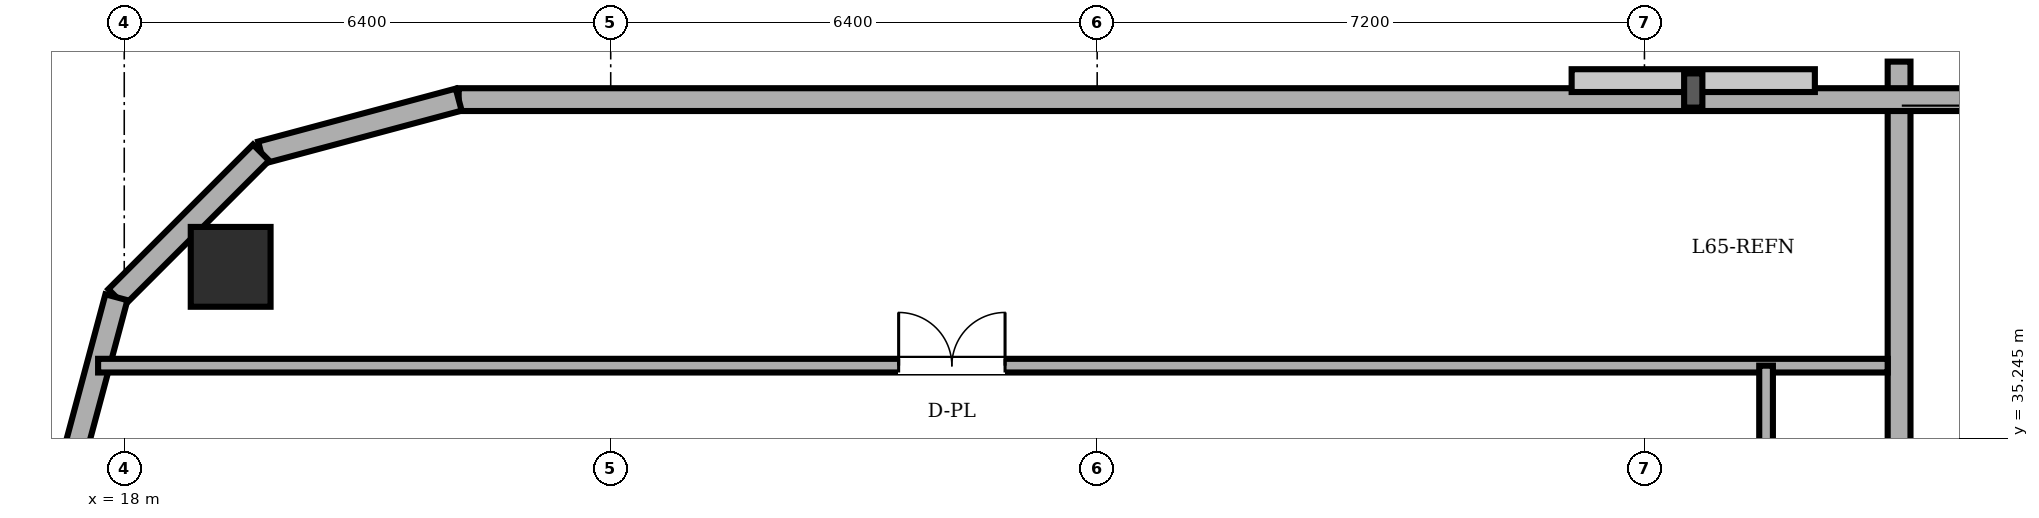
"""IFC4 building model, lengths in metres.
Left out: names, types, materials, properties, quantities, classifications, styles, units other than length and angle.
Written with IfcOpenShell. Run it as: python <this file> out.ifc"""

import sys

from ifc_helpers import new_model, si_unit, direction, frame, frame_2d, origin, origin_2d, place, context, subcontext, project, spatial, rectangle, circle, extrude, element, fill, save


model = new_model("IFC4")
c1 = context("Model", 3, precision=1e-05, world=origin(), true_north=direction((0.0, 1.0)))
c2 = subcontext(c1, "Body", "Model", "MODEL_VIEW")
j1 = project(units=[si_unit("LENGTHUNIT", "METRE"), si_unit("PLANEANGLEUNIT", "RADIAN")], contexts=[c1])
p1 = place(None, origin())
s1 = spatial("IfcSite", under=j1, at=p1, CompositionType="ELEMENT")
p2 = place(p1, origin())
s2 = spatial("IfcBuilding", under=s1, at=p2, CompositionType="ELEMENT")
p3 = place(p2, frame((0.0, 0.0, 248.1)))
s3 = spatial("IfcBuildingStorey", under=s2, at=p3, CompositionType="ELEMENT", Elevation=248.1)
p4 = place(p3, frame((19.4, 37.5, 0.0), z_axis=(0.0, 0.0, 1.0), x_axis=(1.0, 0.0, 0.0)))
e1 = element("IfcColumn", 1, at=p4, inside=s3, PredefinedType="COLUMN", context=c2, shape_type="SweptSolid", body=[
    extrude(circle(Radius=0.525, at=origin_2d()), origin(), (0.0, 0.0, 1.0), 2.96),
])
p5 = place(p3, frame((41.35, 7.8, 0.0), z_axis=(0.0, 0.0, 1.0), x_axis=(0.0, 1.0, 0.0)))
e2 = element("IfcWall", 2, at=p5, inside=s3, PredefinedType="SOLIDWALL", context=c2, shape_type="SweptSolid", body=[
    extrude(rectangle(XDim=32.4, YDim=0.3, at=frame_2d((16.2, 0.0))), origin(), (0.0, 0.0, 1.0), 5.36),
])
p6 = place(p3, frame((54.885, 39.7, 0.0), z_axis=(0.0, 0.0, 1.0), x_axis=(-1.0, 0.0, 0.0)))
e3 = element("IfcWall", 3, at=p6, inside=s3, PredefinedType="SOLIDWALL", context=c2, shape_type="SweptSolid", body=[
    extrude(rectangle(XDim=32.485, YDim=0.3, at=frame_2d((16.243, 0.0))), origin(), (0.0, 0.0, 1.0), 5.36),
])
p7 = place(p3, frame((22.4, 39.7, 0.0), z_axis=(0.0, 0.0, 1.0), x_axis=(-0.965889330541, -0.258955210695, 0.0)))
e4 = element("IfcWall", 4, at=p7, inside=s3, PredefinedType="SOLIDWALL", context=c2, shape_type="SweptSolid", body=[
    extrude(rectangle(XDim=2.692, YDim=0.3, at=frame_2d((1.346, 0.0))), origin(), (0.0, 0.0, 1.0), 5.36),
])
p8 = place(p3, frame((19.8, 39.003, 0.0), z_axis=(0.0, 0.0, 1.0), x_axis=(-0.707152139074, -0.70706142039, 0.0)))
e5 = element("IfcWall", 5, at=p8, inside=s3, PredefinedType="SOLIDWALL", context=c2, shape_type="SweptSolid", body=[
    extrude(rectangle(XDim=2.691, YDim=0.3, at=frame_2d((1.346, 0.0))), origin(), (0.0, 0.0, 1.0), 5.36),
])
p9 = place(p3, frame((17.897, 37.1, 0.0), z_axis=(0.0, 0.0, 1.0), x_axis=(-0.258932525951, -0.965895412042, 0.0)))
e6 = element("IfcWall", 6, at=p9, inside=s3, PredefinedType="SOLIDWALL", context=c2, shape_type="SweptSolid", body=[
    extrude(rectangle(XDim=2.692, YDim=0.3, at=frame_2d((1.346, 0.0))), origin(), (0.0, 0.0, 1.0), 5.36),
])
p10 = place(p3, frame((17.656, 36.2, 0.0), z_axis=(0.0, 0.0, 1.0), x_axis=(1.0, 0.0, 0.0)))
e7 = element("IfcWall", 7, at=p10, inside=s3, PredefinedType="PARTITIONING", context=c2, shape_type="SweptSolid", body=[
    extrude(rectangle(XDim=23.544, YDim=0.18, at=frame_2d((11.772, 0.0))), origin(), (0.0, 0.0, 1.0), 5.36),
])
p11 = place(p10, frame((10.532, 0.0, 0.0)))
e8 = element("IfcOpeningElement", 8, at=p11, cuts=e7, PredefinedType="OPENING", context=c2, shape_type="SweptSolid", body=[
    extrude(rectangle(XDim=1.4, YDim=2.25, at=frame_2d((0.7, 1.125))), frame((0.0, 0.1, 0.0), z_axis=(0.0, -1.0, 0.0), x_axis=(1.0, 0.0, 0.0)), (0.0, 0.0, 1.0), 0.2),
])
p12 = place(p3, frame((39.6, 11.8, 0.0), z_axis=(0.0, 0.0, 1.0), x_axis=(0.0, 1.0, 0.0)))
e9 = element("IfcWall", 9, at=p12, inside=s3, PredefinedType="PARTITIONING", context=c2, shape_type="SweptSolid", body=[
    extrude(rectangle(XDim=24.4, YDim=0.18, at=frame_2d((12.2, 0.0))), origin(), (0.0, 0.0, 1.0), 5.36),
])
p13 = place(p12, frame((11.5, 0.0, 0.0)))
e10 = element("IfcOpeningElement", 10, at=p13, cuts=e9, PredefinedType="OPENING", context=c2, shape_type="SweptSolid", body=[
    extrude(rectangle(XDim=1.4, YDim=2.25, at=frame_2d((0.7, 1.125))), frame((0.0, 0.1, 0.0), z_axis=(0.0, -1.0, 0.0), x_axis=(1.0, 0.0, 0.0)), (0.0, 0.0, 1.0), 0.2),
])
p14 = place(p11, origin())
e11 = element("IfcDoor", 11, at=p14, inside=s3, OperationType="DOUBLE_DOOR_SINGLE_SWING", PredefinedType="DOOR", context=c2, shape_type="SweptSolid", body=[
    extrude(rectangle(XDim=1.4, YDim=2.25, at=frame_2d((0.7, 1.125))), frame((0.0, 0.025, 0.0), z_axis=(0.0, -1.0, 0.0), x_axis=(1.0, 0.0, 0.0)), (0.0, 0.0, 1.0), 0.05),
])
fill(e8, e11)
save(model, sys.argv[1])
